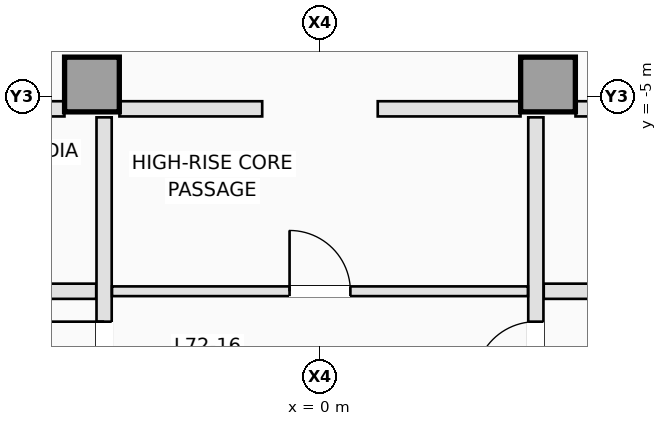
"""IFC4 building model, lengths in metres.
Left out: names, types, materials, properties, quantities, classifications, styles, units other than length and angle.
Written with IfcOpenShell. Run it as: python <this file> out.ifc"""

import sys

from ifc_helpers import new_model, si_unit, direction, frame, frame_2d, origin, origin_2d, place, context, subcontext, project, spatial, rectangle, extrude, element, fill, save


model = new_model("IFC4")
c1 = context("Model", 3, precision=1e-05, world=origin(), true_north=direction((0.0, 1.0)))
c2 = subcontext(c1, "Body", "Model", "MODEL_VIEW")
j1 = project(units=[si_unit("LENGTHUNIT", "METRE"), si_unit("PLANEANGLEUNIT", "RADIAN")], contexts=[c1])
p1 = place(None, origin())
s1 = spatial("IfcSite", under=j1, at=p1, CompositionType="ELEMENT")
p2 = place(p1, origin())
s2 = spatial("IfcBuilding", under=s1, at=p2, CompositionType="ELEMENT")
p3 = place(p2, frame((0.0, 0.0, 260.4)))
s3 = spatial("IfcBuildingStorey", under=s2, at=p3, CompositionType="ELEMENT", Elevation=260.4)
for number, where, z_axis, x_axis in (
    (1, (-3.75, -4.8, 0.0), (0.0, 0.0, 1.0), (1.0, 0.0, 0.0)),
    (2, (3.75, -4.8, 0.0), (0.0, 0.0, 1.0), (1.0, 0.0, 0.0)),
):
    element("IfcColumn", number, at=place(p3, frame(where, z_axis=z_axis, x_axis=x_axis)), inside=s3, PredefinedType="COLUMN", context=c2, shape_type="SweptSolid", body=[
        extrude(rectangle(XDim=0.9, YDim=0.9, at=origin_2d()), origin(), (0.0, 0.0, 1.0), 3.5),
    ])
for number, where, z_axis, x_axis in (
    (3, (-8.92, -8.2, 0.0), (0.0, 0.0, 1.0), (1.0, 0.0, 0.0)),
    (4, (3.68, -8.2, 0.0), (0.0, 0.0, 1.0), (1.0, 0.0, 0.0)),
):
    element("IfcWall", number, at=place(p3, frame(where, z_axis=z_axis, x_axis=x_axis)), inside=s3, PredefinedType="PARTITIONING", context=c2, shape_type="SweptSolid", body=[
        extrude(rectangle(XDim=5.24, YDim=0.25, at=frame_2d((2.62, 0.0))), origin(), (0.0, 0.0, 1.0), 3.25),
    ])
p4 = place(p3, frame((-3.55, -15.898, 0.0), z_axis=(0.0, 0.0, 1.0), x_axis=(0.0, 1.0, 0.0)))
e5 = element("IfcWall", 5, at=p4, inside=s3, PredefinedType="PARTITIONING", context=c2, shape_type="SweptSolid", body=[
    extrude(rectangle(XDim=10.558, YDim=0.25, at=frame_2d((5.279, 0.0))), origin(), (0.0, 0.0, 1.0), 3.25),
])
p5 = place(p4, frame((6.198, 0.0, 0.0)))
e6 = element("IfcOpeningElement", 6, at=p5, cuts=e5, PredefinedType="OPENING", context=c2, shape_type="SweptSolid", body=[
    extrude(rectangle(XDim=1.0, YDim=2.15, at=frame_2d((0.5, 1.075))), frame((0.0, 0.135, 0.0), z_axis=(0.0, -1.0, 0.0), x_axis=(1.0, 0.0, 0.0)), (0.0, 0.0, 1.0), 0.27),
])
p6 = place(p3, frame((3.55, -15.898, 0.0), z_axis=(0.0, 0.0, 1.0), x_axis=(0.0, 1.0, 0.0)))
e7 = element("IfcWall", 7, at=p6, inside=s3, PredefinedType="PARTITIONING", context=c2, shape_type="SweptSolid", body=[
    extrude(rectangle(XDim=10.558, YDim=0.25, at=frame_2d((5.279, 0.0))), origin(), (0.0, 0.0, 1.0), 3.25),
])
p7 = place(p6, frame((6.198, 0.0, 0.0)))
e8 = element("IfcOpeningElement", 8, at=p7, cuts=e7, PredefinedType="OPENING", context=c2, shape_type="SweptSolid", body=[
    extrude(rectangle(XDim=1.0, YDim=2.15, at=frame_2d((0.5, 1.075))), frame((0.0, 0.135, 0.0), z_axis=(0.0, -1.0, 0.0), x_axis=(1.0, 0.0, 0.0)), (0.0, 0.0, 1.0), 0.27),
])
p8 = place(p3, frame((-12.48, -5.2, 0.0), z_axis=(0.0, 0.0, 1.0), x_axis=(1.0, 0.0, 0.0)))
e9 = element("IfcWall", 9, at=p8, inside=s3, PredefinedType="PARTITIONING", context=c2, shape_type="SweptSolid", body=[
    extrude(rectangle(XDim=8.278, YDim=0.25, at=frame_2d((4.139, 0.0))), origin(), (0.0, 0.0, 1.0), 3.25),
])
p9 = place(p8, frame((3.05, 0.0, 0.0)))
e10 = element("IfcOpeningElement", 10, at=p9, cuts=e9, PredefinedType="OPENING", context=c2, shape_type="SweptSolid", body=[
    extrude(rectangle(XDim=0.92, YDim=2.12, at=frame_2d((0.46, 1.06))), frame((0.0, 0.135, 0.0), z_axis=(0.0, -1.0, 0.0), x_axis=(1.0, 0.0, 0.0)), (0.0, 0.0, 1.0), 0.27),
])
p10 = place(p8, frame((6.15, 0.0, 0.0)))
e11 = element("IfcOpeningElement", 11, at=p10, cuts=e9, PredefinedType="OPENING", context=c2, shape_type="SweptSolid", body=[
    extrude(rectangle(XDim=0.92, YDim=2.12, at=frame_2d((0.46, 1.06))), frame((0.0, 0.135, 0.0), z_axis=(0.0, -1.0, 0.0), x_axis=(1.0, 0.0, 0.0)), (0.0, 0.0, 1.0), 0.27),
])
p11 = place(p3, frame((4.202, -5.2, 0.0), z_axis=(0.0, 0.0, 1.0), x_axis=(1.0, 0.0, 0.0)))
e12 = element("IfcWall", 12, at=p11, inside=s3, PredefinedType="PARTITIONING", context=c2, shape_type="SweptSolid", body=[
    extrude(rectangle(XDim=8.278, YDim=0.25, at=frame_2d((4.139, 0.0))), origin(), (0.0, 0.0, 1.0), 3.25),
])
p12 = place(p11, frame((0.748, 0.0, 0.0)))
e13 = element("IfcOpeningElement", 13, at=p12, cuts=e12, PredefinedType="OPENING", context=c2, shape_type="SweptSolid", body=[
    extrude(rectangle(XDim=1.0, YDim=2.15, at=frame_2d((0.5, 1.075))), frame((0.0, 0.135, 0.0), z_axis=(0.0, -1.0, 0.0), x_axis=(1.0, 0.0, 0.0)), (0.0, 0.0, 1.0), 0.27),
])
p13 = place(p11, frame((2.698, 0.0, 0.0)))
e14 = element("IfcOpeningElement", 14, at=p13, cuts=e12, PredefinedType="OPENING", context=c2, shape_type="SweptSolid", body=[
    extrude(rectangle(XDim=1.0, YDim=2.15, at=frame_2d((0.5, 1.075))), frame((0.0, 0.135, 0.0), z_axis=(0.0, -1.0, 0.0), x_axis=(1.0, 0.0, 0.0)), (0.0, 0.0, 1.0), 0.27),
])
p14 = place(p11, frame((4.648, 0.0, 0.0)))
e15 = element("IfcOpeningElement", 15, at=p14, cuts=e12, PredefinedType="OPENING", context=c2, shape_type="SweptSolid", body=[
    extrude(rectangle(XDim=1.0, YDim=2.15, at=frame_2d((0.5, 1.075))), frame((0.0, 0.135, 0.0), z_axis=(0.0, -1.0, 0.0), x_axis=(1.0, 0.0, 0.0)), (0.0, 0.0, 1.0), 0.27),
])
p15 = place(p11, frame((6.598, 0.0, 0.0)))
e16 = element("IfcOpeningElement", 16, at=p15, cuts=e12, PredefinedType="OPENING", context=c2, shape_type="SweptSolid", body=[
    extrude(rectangle(XDim=1.0, YDim=2.15, at=frame_2d((0.5, 1.075))), frame((0.0, 0.135, 0.0), z_axis=(0.0, -1.0, 0.0), x_axis=(1.0, 0.0, 0.0)), (0.0, 0.0, 1.0), 0.27),
])
for number, where, z_axis, x_axis in (
    (17, (-3.298, -5.2, 0.0), (0.0, 0.0, 1.0), (1.0, 0.0, 0.0)),
    (18, (0.95, -5.2, 0.0), (0.0, 0.0, 1.0), (1.0, 0.0, 0.0)),
):
    element("IfcWall", number, at=place(p3, frame(where, z_axis=z_axis, x_axis=x_axis)), inside=s3, PredefinedType="PARTITIONING", context=c2, shape_type="SweptSolid", body=[
        extrude(rectangle(XDim=2.348, YDim=0.25, at=frame_2d((1.174, 0.0))), origin(), (0.0, 0.0, 1.0), 3.25),
    ])
p16 = place(p3, frame((-3.42, -8.2, 0.0), z_axis=(0.0, 0.0, 1.0), x_axis=(1.0, 0.0, 0.0)))
e19 = element("IfcWall", 19, at=p16, inside=s3, PredefinedType="PARTITIONING", context=c2, shape_type="SweptSolid", body=[
    extrude(rectangle(XDim=6.84, YDim=0.16, at=frame_2d((3.42, 0.0))), origin(), (0.0, 0.0, 1.0), 3.25),
])
p17 = place(p16, frame((2.92, 0.0, 0.0)))
e20 = element("IfcOpeningElement", 20, at=p17, cuts=e19, PredefinedType="OPENING", context=c2, shape_type="SweptSolid", body=[
    extrude(rectangle(XDim=1.0, YDim=2.15, at=frame_2d((0.5, 1.075))), frame((0.0, 0.09, 0.0), z_axis=(0.0, -1.0, 0.0), x_axis=(1.0, 0.0, 0.0)), (0.0, 0.0, 1.0), 0.18),
])
p18 = place(p5, origin())
e21 = element("IfcDoor", 21, at=p18, inside=s3, OperationType="SINGLE_SWING_RIGHT", PredefinedType="DOOR", context=c2, shape_type="SweptSolid", body=[
    extrude(rectangle(XDim=1.0, YDim=2.15, at=frame_2d((0.5, 1.075))), frame((0.0, 0.025, 0.0), z_axis=(0.0, -1.0, 0.0), x_axis=(1.0, 0.0, 0.0)), (0.0, 0.0, 1.0), 0.05),
])
fill(e6, e21)
p19 = place(p7, origin())
e22 = element("IfcDoor", 22, at=p19, inside=s3, OperationType="SINGLE_SWING_LEFT", PredefinedType="DOOR", context=c2, shape_type="SweptSolid", body=[
    extrude(rectangle(XDim=1.0, YDim=2.15, at=frame_2d((0.5, 1.075))), frame((0.0, 0.025, 0.0), z_axis=(0.0, -1.0, 0.0), x_axis=(1.0, 0.0, 0.0)), (0.0, 0.0, 1.0), 0.05),
])
fill(e8, e22)
p20 = place(p17, origin())
e23 = element("IfcDoor", 23, at=p20, inside=s3, OperationType="SINGLE_SWING_LEFT", PredefinedType="DOOR", context=c2, shape_type="SweptSolid", body=[
    extrude(rectangle(XDim=1.0, YDim=2.15, at=frame_2d((0.5, 1.075))), frame((0.0, 0.025, 0.0), z_axis=(0.0, -1.0, 0.0), x_axis=(1.0, 0.0, 0.0)), (0.0, 0.0, 1.0), 0.05),
])
fill(e20, e23)
save(model, sys.argv[1])
